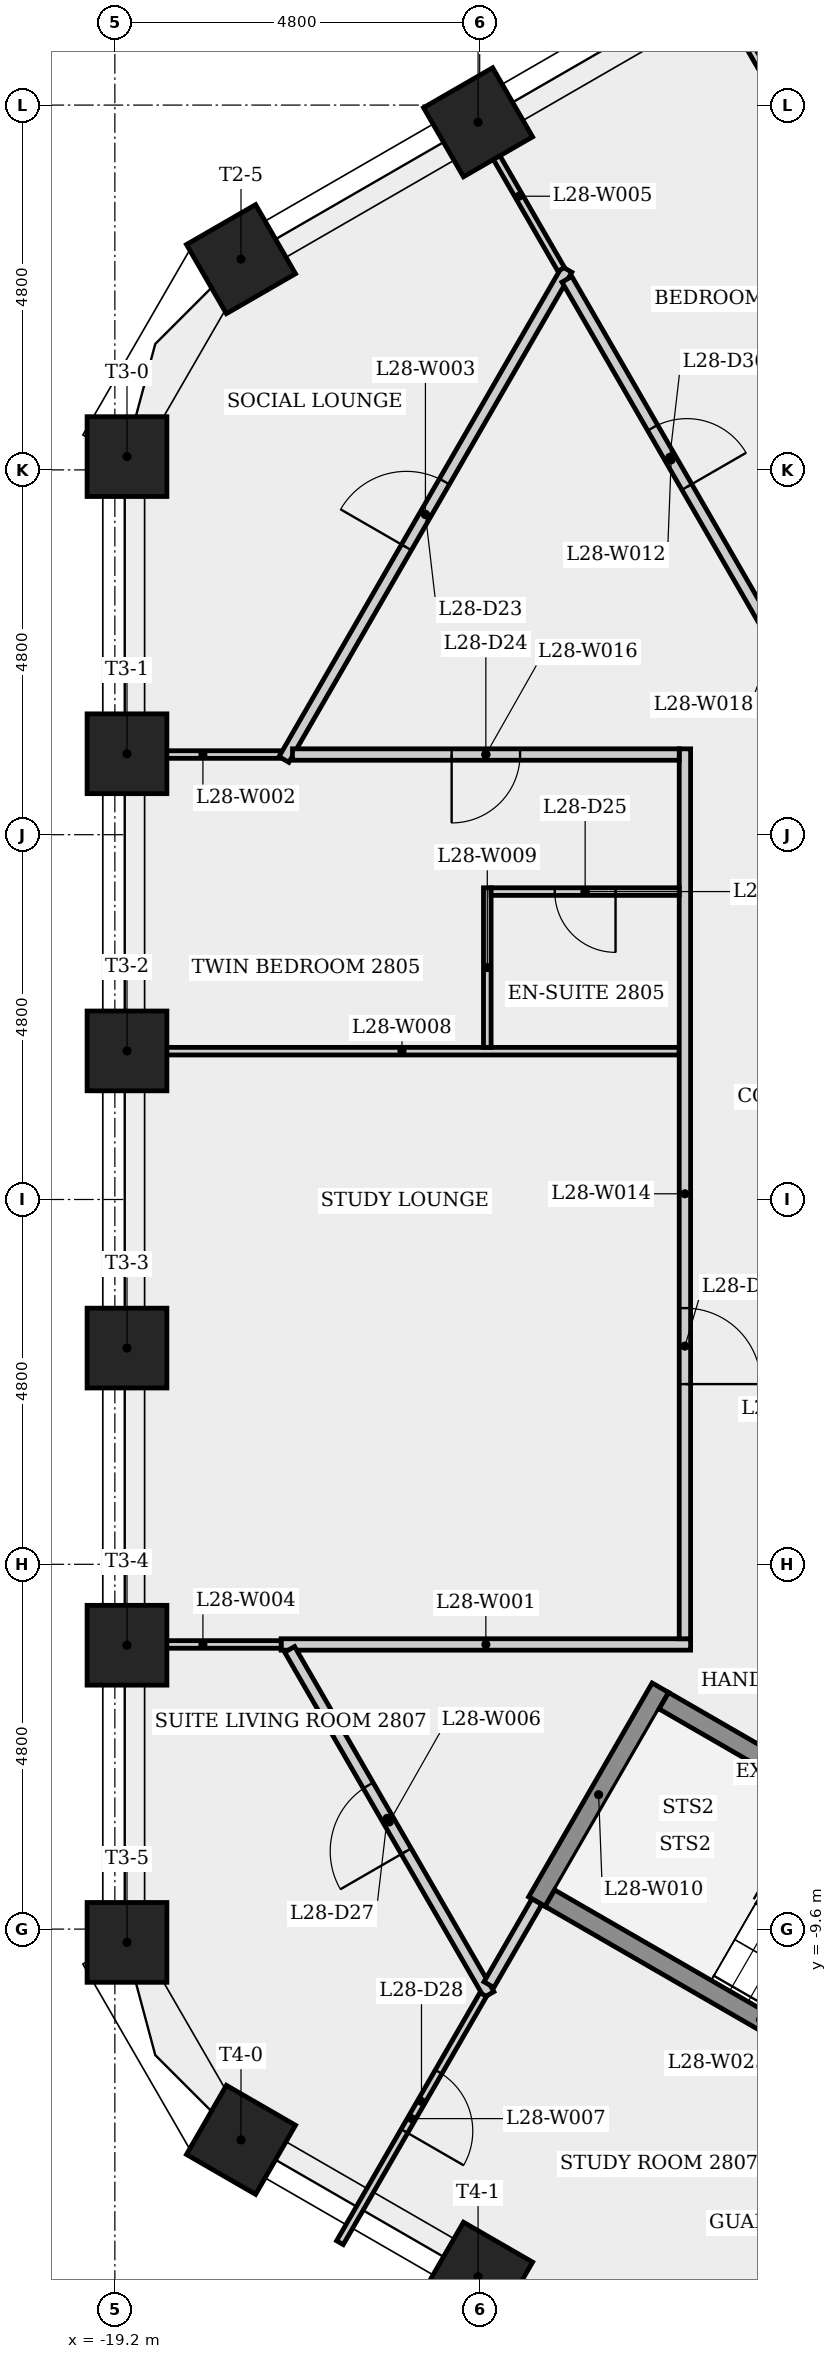
"""IFC4 building model, lengths in metres.
Left out: names, types, materials, properties, quantities, classifications, styles, units other than length and angle.
Written with IfcOpenShell. Run it as: python <this file> out.ifc"""

import sys

from ifc_helpers import new_model, si_unit, direction, frame, frame_2d, origin, origin_2d, place, context, subcontext, project, spatial, rectangle, extrude, element, fill, save


model = new_model("IFC4")
c1 = context("Model", 3, precision=1e-05, world=origin(), true_north=direction((0.0, 1.0)))
c2 = subcontext(c1, "Body", "Model", "MODEL_VIEW")
j1 = project(units=[si_unit("LENGTHUNIT", "METRE"), si_unit("PLANEANGLEUNIT", "RADIAN")], contexts=[c1])
p1 = place(None, origin())
s1 = spatial("IfcSite", under=j1, at=p1, CompositionType="ELEMENT")
p2 = place(p1, origin())
s2 = spatial("IfcBuilding", under=s1, at=p2, CompositionType="ELEMENT")
p3 = place(p2, frame((0.0, 0.0, 106.9)))
s3 = spatial("IfcBuildingStorey", under=s2, at=p3, CompositionType="ELEMENT", Elevation=106.9)
for number, where, z_axis, x_axis in (
    (1, (-14.421, 14.174, 0.0), (0.0, 0.0, 1.0), (-0.5, 0.866, 0.0)),
    (2, (-17.541, 12.373, 0.0), (0.0, 0.0, 1.0), (-0.5, 0.866, 0.0)),
    (3, (-19.041, 9.775, 0.0), (0.0, 0.0, 1.0), (-1.0, 0.0, 0.0)),
    (4, (-19.041, 5.865, 0.0), (0.0, 0.0, 1.0), (-1.0, 0.0, 0.0)),
    (5, (-19.041, 1.955, 0.0), (0.0, 0.0, 1.0), (-1.0, 0.0, 0.0)),
    (6, (-19.041, -1.955, 0.0), (0.0, 0.0, 1.0), (-1.0, 0.0, 0.0)),
    (7, (-19.041, -5.865, 0.0), (0.0, 0.0, 1.0), (-1.0, 0.0, 0.0)),
    (8, (-19.041, -9.775, 0.0), (0.0, 0.0, 1.0), (-1.0, 0.0, 0.0)),
    (9, (-17.541, -12.373, 0.0), (0.0, 0.0, 1.0), (-0.5, -0.866, 0.0)),
    (10, (-14.421, -14.174, 0.0), (0.0, 0.0, 1.0), (-0.5, -0.866, 0.0)),
):
    element("IfcColumn", number, at=place(p3, frame(where, z_axis=z_axis, x_axis=x_axis)), inside=s3, PredefinedType="COLUMN", context=c2, shape_type="SweptSolid", body=[
        extrude(rectangle(XDim=1.05, YDim=1.05, at=origin_2d()), origin(), (0.0, 0.0, 1.0), 3.4),
    ])
p4 = place(p3, frame((-17.013, -5.855, 0.0), z_axis=(0.0, 0.0, 1.0), x_axis=(1.0, 0.0, 0.0)))
e11 = element("IfcWall", 11, at=p4, inside=s3, PredefinedType="PARTITIONING", context=c2, shape_type="SweptSolid", body=[
    extrude(rectangle(XDim=5.388, YDim=0.15, at=frame_2d((2.694, 0.0))), origin(), (0.0, 0.0, 1.0), 3.05),
])
p5 = place(p3, frame((-17.013, 5.855, 0.0), z_axis=(0.0, 0.0, 1.0), x_axis=(-1.0, 0.0, 0.0)))
e12 = element("IfcWall", 12, at=p5, inside=s3, PredefinedType="PARTITIONING", context=c2, shape_type="SweptSolid", body=[
    extrude(rectangle(XDim=2.057, YDim=0.1, at=frame_2d((1.029, 0.0))), origin(), (0.0, 0.0, 1.0), 3.05),
])
p6 = place(p3, frame((-16.976, 5.79, 0.0), z_axis=(0.0, 0.0, 1.0), x_axis=(0.500025198357, 0.866010855017, 0.0)))
e13 = element("IfcWall", 13, at=p6, inside=s3, PredefinedType="PARTITIONING", context=c2, shape_type="SweptSolid", body=[
    extrude(rectangle(XDim=7.446, YDim=0.15, at=frame_2d((3.723, 0.0))), origin(), (0.0, 0.0, 1.0), 3.05),
])
p7 = place(p6, frame((3.223, 0.0, 0.0)))
e14 = element("IfcOpeningElement", 14, at=p7, cuts=e13, PredefinedType="OPENING", context=c2, shape_type="SweptSolid", body=[
    extrude(rectangle(XDim=1.0, YDim=2.1, at=frame_2d((0.5, 1.05))), frame((0.0, 0.085, 0.0), z_axis=(0.0, -1.0, 0.0), x_axis=(1.0, 0.0, 0.0)), (0.0, 0.0, 1.0), 0.17),
])
p8 = place(p3, frame((-17.013, -5.855, 0.0), z_axis=(0.0, 0.0, 1.0), x_axis=(-1.0, 0.0, 0.0)))
e15 = element("IfcWall", 15, at=p8, inside=s3, PredefinedType="PARTITIONING", context=c2, shape_type="SweptSolid", body=[
    extrude(rectangle(XDim=2.057, YDim=0.1, at=frame_2d((1.029, 0.0))), origin(), (0.0, 0.0, 1.0), 3.05),
])
p9 = place(p3, frame((-14.439, 14.164, 0.0), z_axis=(0.0, 0.0, 1.0), x_axis=(0.500036104519, -0.866004557827, 0.0)))
e16 = element("IfcWall", 16, at=p9, inside=s3, PredefinedType="PARTITIONING", context=c2, shape_type="SweptSolid", body=[
    extrude(rectangle(XDim=2.223, YDim=0.1, at=frame_2d((1.112, 0.0))), origin(), (0.0, 0.0, 1.0), 3.05),
])
p10 = place(p3, frame((-14.279, -10.461, 0.0), z_axis=(0.0, 0.0, 1.0), x_axis=(-0.49998979122, 0.866031297746, 0.0)))
e17 = element("IfcWall", 17, at=p10, inside=s3, PredefinedType="PARTITIONING", context=c2, shape_type="SweptSolid", body=[
    extrude(rectangle(XDim=5.244, YDim=0.15, at=frame_2d((2.622, 0.0))), origin(), (0.0, 0.0, 1.0), 3.05),
])
p11 = place(p10, frame((2.177, 0.0, 0.0)))
e18 = element("IfcOpeningElement", 18, at=p11, cuts=e17, PredefinedType="OPENING", context=c2, shape_type="SweptSolid", body=[
    extrude(rectangle(XDim=1.0, YDim=2.1, at=frame_2d((0.5, 1.05))), frame((0.0, 0.085, 0.0), z_axis=(0.0, -1.0, 0.0), x_axis=(1.0, 0.0, 0.0)), (0.0, 0.0, 1.0), 0.17),
])
p12 = place(p3, frame((-14.354, -10.461, 0.0), z_axis=(0.0, 0.0, 1.0), x_axis=(-0.499997093526, -0.866027081832, 0.0)))
e19 = element("IfcWall", 19, at=p12, inside=s3, PredefinedType="PARTITIONING", context=c2, shape_type="SweptSolid", body=[
    extrude(rectangle(XDim=3.771, YDim=0.1, at=frame_2d((1.885, 0.0))), origin(), (0.0, 0.0, 1.0), 3.05),
])
p13 = place(p12, frame((1.175, 0.0, 0.0)))
e20 = element("IfcOpeningElement", 20, at=p13, cuts=e19, PredefinedType="OPENING", context=c2, shape_type="SweptSolid", body=[
    extrude(rectangle(XDim=0.9, YDim=2.1, at=frame_2d((0.45, 1.05))), frame((0.0, 0.06, 0.0), z_axis=(0.0, -1.0, 0.0), x_axis=(1.0, 0.0, 0.0)), (0.0, 0.0, 1.0), 0.12),
])
p14 = place(p3, frame((-19.07, 1.952, 0.0), z_axis=(0.0, 0.0, 1.0), x_axis=(1.0, 0.0, 0.0)))
e21 = element("IfcWall", 21, at=p14, inside=s3, PredefinedType="PARTITIONING", context=c2, shape_type="SweptSolid", body=[
    extrude(rectangle(XDim=7.295, YDim=0.1, at=frame_2d((3.647, 0.0))), origin(), (0.0, 0.0, 1.0), 3.05),
])
p15 = place(p3, frame((-14.3, 4.102, 0.0), z_axis=(0.0, 0.0, 1.0), x_axis=(0.0, -1.0, 0.0)))
e22 = element("IfcWall", 22, at=p15, inside=s3, PredefinedType="PARTITIONING", context=c2, shape_type="SweptSolid", body=[
    extrude(rectangle(XDim=2.1, YDim=0.1, at=frame_2d((1.05, 0.0))), origin(), (0.0, 0.0, 1.0), 3.05),
])
p16 = place(p3, frame((-13.648, -9.239, 0.0), z_axis=(0.0, 0.0, 1.0), x_axis=(0.500017246033, 0.866015446554, 0.0)))
e23 = element("IfcWall", 23, at=p16, inside=s3, PredefinedType="SHEAR", context=c2, shape_type="SweptSolid", body=[
    extrude(rectangle(XDim=3.25, YDim=0.25, at=frame_2d((1.625, 0.0))), origin(), (0.0, 0.0, 1.0), 3.05),
])
p17 = place(p3, frame((-13.648, -9.239, 0.0), z_axis=(0.0, 0.0, 1.0), x_axis=(-0.50013570633, -0.86594703952, 0.0)))
e24 = element("IfcWall", 24, at=p17, inside=s3, PredefinedType="PARTITIONING", context=c2, shape_type="SweptSolid", body=[
    extrude(rectangle(XDim=1.261, YDim=0.15, at=frame_2d((0.631, 0.0))), origin(), (0.0, 0.0, 1.0), 3.05),
])
p18 = place(p3, frame((-13.252, 12.108, 0.0), z_axis=(0.0, 0.0, 1.0), x_axis=(0.500015161905, -0.866016649877, 0.0)))
e25 = element("IfcWall", 25, at=p18, inside=s3, PredefinedType="PARTITIONING", context=c2, shape_type="SweptSolid", body=[
    extrude(rectangle(XDim=5.487, YDim=0.15, at=frame_2d((2.744, 0.0))), origin(), (0.0, 0.0, 1.0), 3.05),
])
p19 = place(p18, frame((2.256, 0.0, 0.0)))
e26 = element("IfcOpeningElement", 26, at=p19, cuts=e25, PredefinedType="OPENING", context=c2, shape_type="SweptSolid", body=[
    extrude(rectangle(XDim=0.9, YDim=2.1, at=frame_2d((0.45, 1.05))), frame((0.0, 0.085, 0.0), z_axis=(0.0, -1.0, 0.0), x_axis=(1.0, 0.0, 0.0)), (0.0, 0.0, 1.0), 0.17),
])
p20 = place(p3, frame((-11.977, -6.595, 0.0), z_axis=(0.0, 0.0, 1.0), x_axis=(0.866025499775, -0.499999833739, 0.0)))
e27 = element("IfcWall", 27, at=p20, inside=s3, PredefinedType="SHEAR", context=c2, shape_type="SweptSolid", body=[
    extrude(rectangle(XDim=6.4, YDim=0.25, at=frame_2d((3.2, 0.0))), origin(), (0.0, 0.0, 1.0), 3.05),
])
p21 = place(p20, frame((5.025, 0.0, 0.0)))
e28 = element("IfcOpeningElement", 28, at=p21, cuts=e27, PredefinedType="OPENING", context=c2, shape_type="SweptSolid", body=[
    extrude(rectangle(XDim=1.0, YDim=2.1, at=frame_2d((0.5, 1.05))), frame((0.0, 0.135, 0.0), z_axis=(0.0, -1.0, 0.0), x_axis=(1.0, 0.0, 0.0)), (0.0, 0.0, 1.0), 0.27),
])
p22 = place(p3, frame((-11.7, 5.93, 0.0), z_axis=(0.0, 0.0, 1.0), x_axis=(0.0, -1.0, 0.0)))
e29 = element("IfcWall", 29, at=p22, inside=s3, PredefinedType="PARTITIONING", context=c2, shape_type="SweptSolid", body=[
    extrude(rectangle(XDim=11.709, YDim=0.15, at=frame_2d((5.855, 0.0))), origin(), (0.0, 0.0, 1.0), 3.05),
])
p23 = place(p22, frame((7.359, 0.0, 0.0)))
e30 = element("IfcOpeningElement", 30, at=p23, cuts=e29, PredefinedType="OPENING", context=c2, shape_type="SweptSolid", body=[
    extrude(rectangle(XDim=1.0, YDim=2.1, at=frame_2d((0.5, 1.05))), frame((0.0, 0.085, 0.0), z_axis=(0.0, -1.0, 0.0), x_axis=(1.0, 0.0, 0.0)), (0.0, 0.0, 1.0), 0.17),
])
p24 = place(p3, frame((-11.775, 4.052, 0.0), z_axis=(0.0, 0.0, 1.0), x_axis=(-1.0, 0.0, 0.0)))
e31 = element("IfcWall", 31, at=p24, inside=s3, PredefinedType="PARTITIONING", context=c2, shape_type="SweptSolid", body=[
    extrude(rectangle(XDim=2.475, YDim=0.1, at=frame_2d((1.238, 0.0))), origin(), (0.0, 0.0, 1.0), 3.05),
])
p25 = place(p24, frame((0.837, 0.0, 0.0)))
e32 = element("IfcOpeningElement", 32, at=p25, cuts=e31, PredefinedType="OPENING", context=c2, shape_type="SweptSolid", body=[
    extrude(rectangle(XDim=0.8, YDim=2.1, at=frame_2d((0.4, 1.05))), frame((0.0, 0.06, 0.0), z_axis=(0.0, -1.0, 0.0), x_axis=(1.0, 0.0, 0.0)), (0.0, 0.0, 1.0), 0.12),
])
p26 = place(p3, frame((-11.775, 5.855, 0.0), z_axis=(0.0, 0.0, 1.0), x_axis=(-1.0, 0.0, 0.0)))
e33 = element("IfcWall", 33, at=p26, inside=s3, PredefinedType="PARTITIONING", context=c2, shape_type="SweptSolid", body=[
    extrude(rectangle(XDim=5.088, YDim=0.15, at=frame_2d((2.544, 0.0))), origin(), (0.0, 0.0, 1.0), 3.05),
])
p27 = place(p26, frame((2.094, 0.0, 0.0)))
e34 = element("IfcOpeningElement", 34, at=p27, cuts=e33, PredefinedType="OPENING", context=c2, shape_type="SweptSolid", body=[
    extrude(rectangle(XDim=0.9, YDim=2.1, at=frame_2d((0.45, 1.05))), frame((0.0, 0.085, 0.0), z_axis=(0.0, -1.0, 0.0), x_axis=(1.0, 0.0, 0.0)), (0.0, 0.0, 1.0), 0.17),
])
p28 = place(p3, frame((-11.308, 15.971, 0.0), z_axis=(0.0, 0.0, 1.0), x_axis=(0.500021201058, -0.866013163002, 0.0)))
e35 = element("IfcWall", 35, at=p28, inside=s3, PredefinedType="PARTITIONING", context=c2, shape_type="SweptSolid", body=[
    extrude(rectangle(XDim=7.711, YDim=0.1, at=frame_2d((3.855, 0.0))), origin(), (0.0, 0.0, 1.0), 3.05),
])
p29 = place(p3, frame((-7.935, -12.393, 0.0), z_axis=(0.0, 0.0, 1.0), x_axis=(-0.866025499775, 0.499999833739, 0.0)))
e36 = element("IfcWall", 36, at=p29, inside=s3, PredefinedType="SHEAR", context=c2, shape_type="SweptSolid", body=[
    extrude(rectangle(XDim=6.4, YDim=0.25, at=frame_2d((3.2, 0.0))), origin(), (0.0, 0.0, 1.0), 3.05),
])
p30 = place(p7, origin())
e37 = element("IfcDoor", 37, at=p30, inside=s3, OperationType="SINGLE_SWING_LEFT", PredefinedType="DOOR", context=c2, shape_type="SweptSolid", body=[
    extrude(rectangle(XDim=1.0, YDim=2.1, at=frame_2d((0.5, 1.05))), frame((0.0, 0.025, 0.0), z_axis=(0.0, -1.0, 0.0), x_axis=(1.0, 0.0, 0.0)), (0.0, 0.0, 1.0), 0.05),
])
fill(e14, e37)
p31 = place(p27, origin())
e38 = element("IfcDoor", 38, at=p31, inside=s3, OperationType="SINGLE_SWING_RIGHT", PredefinedType="DOOR", context=c2, shape_type="SweptSolid", body=[
    extrude(rectangle(XDim=0.9, YDim=2.1, at=frame_2d((0.45, 1.05))), frame((0.0, 0.025, 0.0), z_axis=(0.0, -1.0, 0.0), x_axis=(1.0, 0.0, 0.0)), (0.0, 0.0, 1.0), 0.05),
])
fill(e34, e38)
p32 = place(p25, origin())
e39 = element("IfcDoor", 39, at=p32, inside=s3, OperationType="SINGLE_SWING_LEFT", PredefinedType="DOOR", context=c2, shape_type="SweptSolid", body=[
    extrude(rectangle(XDim=0.8, YDim=2.1, at=frame_2d((0.4, 1.05))), frame((0.0, 0.025, 0.0), z_axis=(0.0, -1.0, 0.0), x_axis=(1.0, 0.0, 0.0)), (0.0, 0.0, 1.0), 0.05),
])
fill(e32, e39)
p33 = place(p23, origin())
e40 = element("IfcDoor", 40, at=p33, inside=s3, OperationType="SINGLE_SWING_RIGHT", PredefinedType="DOOR", context=c2, shape_type="SweptSolid", body=[
    extrude(rectangle(XDim=1.0, YDim=2.1, at=frame_2d((0.5, 1.05))), frame((0.0, 0.025, 0.0), z_axis=(0.0, -1.0, 0.0), x_axis=(1.0, 0.0, 0.0)), (0.0, 0.0, 1.0), 0.05),
])
fill(e30, e40)
p34 = place(p11, origin())
e41 = element("IfcDoor", 41, at=p34, inside=s3, OperationType="SINGLE_SWING_LEFT", PredefinedType="DOOR", context=c2, shape_type="SweptSolid", body=[
    extrude(rectangle(XDim=1.0, YDim=2.1, at=frame_2d((0.5, 1.05))), frame((0.0, 0.025, 0.0), z_axis=(0.0, -1.0, 0.0), x_axis=(1.0, 0.0, 0.0)), (0.0, 0.0, 1.0), 0.05),
])
fill(e18, e41)
p35 = place(p13, origin())
e42 = element("IfcDoor", 42, at=p35, inside=s3, OperationType="SINGLE_SWING_RIGHT", PredefinedType="DOOR", context=c2, shape_type="SweptSolid", body=[
    extrude(rectangle(XDim=0.9, YDim=2.1, at=frame_2d((0.45, 1.05))), frame((0.0, 0.025, 0.0), z_axis=(0.0, -1.0, 0.0), x_axis=(1.0, 0.0, 0.0)), (0.0, 0.0, 1.0), 0.05),
])
fill(e20, e42)
p36 = place(p19, origin())
e43 = element("IfcDoor", 43, at=p36, inside=s3, OperationType="SINGLE_SWING_RIGHT", PredefinedType="DOOR", context=c2, shape_type="SweptSolid", body=[
    extrude(rectangle(XDim=0.9, YDim=2.1, at=frame_2d((0.45, 1.05))), frame((0.0, 0.025, 0.0), z_axis=(0.0, -1.0, 0.0), x_axis=(1.0, 0.0, 0.0)), (0.0, 0.0, 1.0), 0.05),
])
fill(e26, e43)
save(model, sys.argv[1])
